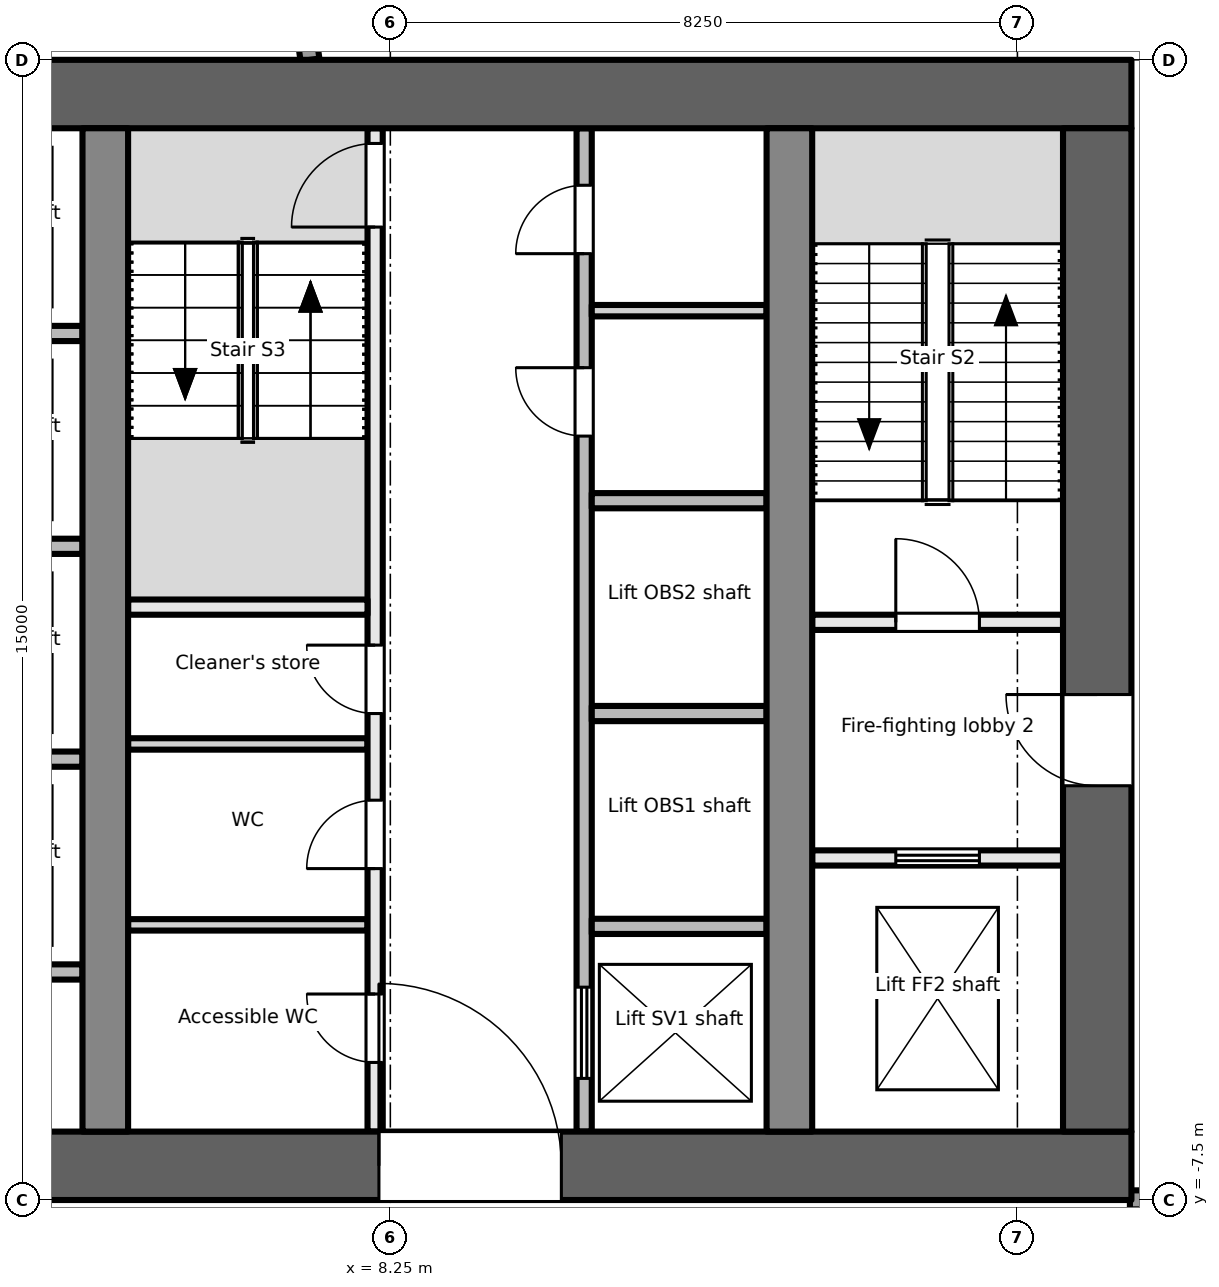
"""IFC4 building model, lengths in metres.
Left out: names, types, materials, properties, quantities, classifications, styles, units other than length and angle.
Written with IfcOpenShell. Run it as: python <this file> out.ifc"""

import sys

from ifc_helpers import new_model, si_unit, direction, frame, frame_2d, origin, place, context, subcontext, project, spatial, rectangle, extrude, element, fill, save


model = new_model("IFC4")
c1 = context("Model", 3, precision=1e-05, world=origin(), true_north=direction((0.0, 1.0)))
c2 = subcontext(c1, "Body", "Model", "MODEL_VIEW")
j1 = project(units=[si_unit("LENGTHUNIT", "METRE"), si_unit("PLANEANGLEUNIT", "RADIAN")], contexts=[c1])
p1 = place(None, origin())
s1 = spatial("IfcSite", under=j1, at=p1, CompositionType="ELEMENT")
p2 = place(p1, origin())
s2 = spatial("IfcBuilding", under=s1, at=p2, CompositionType="ELEMENT")
p3 = place(p2, frame((0.0, 0.0, 244.7)))
s3 = spatial("IfcBuildingStorey", under=s2, at=p3, CompositionType="ELEMENT", Elevation=244.7)
p4 = place(p3, frame((-18.0, -7.05, -0.2), z_axis=(0.0, 0.0, 1.0), x_axis=(1.0, 0.0, 0.0)))
e1 = element("IfcWall", 1, at=p4, inside=s3, PredefinedType="SHEAR", context=c2, shape_type="SweptSolid", body=[
    extrude(rectangle(XDim=36.0, YDim=0.9, at=frame_2d((18.0, 0.0))), origin(), (0.0, 0.0, 1.0), 5.0),
])
p5 = place(p4, frame((8.1, 0.0, 0.2)))
e2 = element("IfcOpeningElement", 2, at=p5, cuts=e1, PredefinedType="OPENING", context=c2, shape_type="SweptSolid", body=[
    extrude(rectangle(XDim=1.8, YDim=2.1, at=frame_2d((0.9, 1.05))), frame((0.0, 0.46, 0.0), z_axis=(0.0, -1.0, 0.0), x_axis=(1.0, 0.0, 0.0)), (0.0, 0.0, 1.0), 0.921),
])
p6 = place(p4, frame((16.8, 0.0, 0.2)))
e3 = element("IfcOpeningElement", 3, at=p6, cuts=e1, PredefinedType="OPENING", context=c2, shape_type="SweptSolid", body=[
    extrude(rectangle(XDim=2.4, YDim=2.1, at=frame_2d((1.2, 1.05))), frame((0.0, 0.46, 0.0), z_axis=(0.0, -1.0, 0.0), x_axis=(1.0, 0.0, 0.0)), (0.0, 0.0, 1.0), 0.921),
])
p7 = place(p4, frame((26.1, 0.0, 0.2)))
e4 = element("IfcOpeningElement", 4, at=p7, cuts=e1, PredefinedType="OPENING", context=c2, shape_type="SweptSolid", body=[
    extrude(rectangle(XDim=2.4, YDim=2.1, at=frame_2d((1.2, 1.05))), frame((0.0, 0.46, 0.0), z_axis=(0.0, -1.0, 0.0), x_axis=(1.0, 0.0, 0.0)), (0.0, 0.0, 1.0), 0.921),
])
p8 = place(p3, frame((-18.0, 7.05, -0.2), z_axis=(0.0, 0.0, 1.0), x_axis=(1.0, 0.0, 0.0)))
e5 = element("IfcWall", 5, at=p8, inside=s3, PredefinedType="SHEAR", context=c2, shape_type="SweptSolid", body=[
    extrude(rectangle(XDim=36.0, YDim=0.9, at=frame_2d((18.0, 0.0))), origin(), (0.0, 0.0, 1.0), 5.0),
])
p9 = place(p3, frame((17.55, -6.6, -0.2), z_axis=(0.0, 0.0, 1.0), x_axis=(0.0, 1.0, 0.0)))
e6 = element("IfcWall", 6, at=p9, inside=s3, PredefinedType="SHEAR", context=c2, shape_type="SweptSolid", body=[
    extrude(rectangle(XDim=13.2, YDim=0.9, at=frame_2d((6.6, 0.0))), origin(), (0.0, 0.0, 1.0), 5.0),
])
p10 = place(p9, frame((4.55, 0.0, 0.2)))
e7 = element("IfcOpeningElement", 7, at=p10, cuts=e6, PredefinedType="OPENING", context=c2, shape_type="SweptSolid", body=[
    extrude(rectangle(XDim=1.2, YDim=2.1, at=frame_2d((0.6, 1.05))), frame((0.0, 0.46, 0.0), z_axis=(0.0, -1.0, 0.0), x_axis=(1.0, 0.0, 0.0)), (0.0, 0.0, 1.0), 0.921),
])
for number, where, z_axis, x_axis in (
    (8, (4.5, -6.6, -0.2), (0.0, 0.0, 1.0), (0.0, 1.0, 0.0)),
    (9, (13.5, -6.6, -0.2), (0.0, 0.0, 1.0), (0.0, 1.0, 0.0)),
):
    element("IfcWall", number, at=place(p3, frame(where, z_axis=z_axis, x_axis=x_axis)), inside=s3, PredefinedType="SHEAR", context=c2, shape_type="SweptSolid", body=[
        extrude(rectangle(XDim=13.2, YDim=0.6, at=frame_2d((6.6, 0.0))), origin(), (0.0, 0.0, 1.0), 5.0),
    ])
p11 = place(p3, frame((13.8, -3.0, 0.0), z_axis=(0.0, 0.0, 1.0), x_axis=(1.0, 0.0, 0.0)))
e10 = element("IfcWall", 10, at=p11, inside=s3, PredefinedType="PARTITIONING", context=c2, shape_type="SweptSolid", body=[
    extrude(rectangle(XDim=3.3, YDim=0.2, at=frame_2d((1.65, 0.0))), origin(), (0.0, 0.0, 1.0), 4.8),
])
p12 = place(p11, frame((1.1, 0.0, 0.0)))
e11 = element("IfcOpeningElement", 11, at=p12, cuts=e10, PredefinedType="OPENING", context=c2, shape_type="SweptSolid", body=[
    extrude(rectangle(XDim=1.1, YDim=2.1, at=frame_2d((0.55, 1.05))), frame((0.0, 0.111, 0.0), z_axis=(0.0, -1.0, 0.0), x_axis=(1.0, 0.0, 0.0)), (0.0, 0.0, 1.0), 0.221),
])
p13 = place(p3, frame((13.8, 0.1, 0.0), z_axis=(0.0, 0.0, 1.0), x_axis=(1.0, 0.0, 0.0)))
e12 = element("IfcWall", 12, at=p13, inside=s3, PredefinedType="PARTITIONING", context=c2, shape_type="SweptSolid", body=[
    extrude(rectangle(XDim=3.3, YDim=0.2, at=frame_2d((1.65, 0.0))), origin(), (0.0, 0.0, 1.0), 4.8),
])
p14 = place(p13, frame((1.1, 0.0, 0.0)))
e13 = element("IfcOpeningElement", 13, at=p14, cuts=e12, PredefinedType="OPENING", context=c2, shape_type="SweptSolid", body=[
    extrude(rectangle(XDim=1.1, YDim=2.1, at=frame_2d((0.55, 1.05))), frame((0.0, 0.111, 0.0), z_axis=(0.0, -1.0, 0.0), x_axis=(1.0, 0.0, 0.0)), (0.0, 0.0, 1.0), 0.221),
])
for number, where, z_axis, x_axis in (
    (14, (1.9, -1.7, 0.0), (0.0, 0.0, 1.0), (1.0, 0.0, 0.0)),
    (15, (1.9, 1.1, 0.0), (0.0, 0.0, 1.0), (1.0, 0.0, 0.0)),
    (16, (1.9, 3.9, 0.0), (0.0, 0.0, 1.0), (1.0, 0.0, 0.0)),
    (17, (1.9, -4.5, 0.0), (0.0, 0.0, 1.0), (1.0, 0.0, 0.0)),
):
    element("IfcWall", number, at=place(p3, frame(where, z_axis=z_axis, x_axis=x_axis)), inside=s3, PredefinedType="PARTITIONING", context=c2, shape_type="SweptSolid", body=[
        extrude(rectangle(XDim=2.3, YDim=0.2, at=frame_2d((1.15, 0.0))), origin(), (0.0, 0.0, 1.0), 4.8),
    ])
p15 = place(p3, frame((8.05, -6.6, 0.0), z_axis=(0.0, 0.0, 1.0), x_axis=(0.0, 1.0, 0.0)))
e18 = element("IfcWall", 18, at=p15, inside=s3, PredefinedType="PARTITIONING", context=c2, shape_type="SweptSolid", body=[
    extrude(rectangle(XDim=13.2, YDim=0.2, at=frame_2d((6.6, 0.0))), origin(), (0.0, 0.0, 1.0), 4.8),
])
p16 = place(p15, frame((0.91, 0.0, 0.0)))
e19 = element("IfcOpeningElement", 19, at=p16, cuts=e18, PredefinedType="OPENING", context=c2, shape_type="SweptSolid", body=[
    extrude(rectangle(XDim=0.9, YDim=2.1, at=frame_2d((0.45, 1.05))), frame((0.0, 0.111, 0.0), z_axis=(0.0, -1.0, 0.0), x_axis=(1.0, 0.0, 0.0)), (0.0, 0.0, 1.0), 0.221),
])
p17 = place(p15, frame((3.46, 0.0, 0.0)))
e20 = element("IfcOpeningElement", 20, at=p17, cuts=e18, PredefinedType="OPENING", context=c2, shape_type="SweptSolid", body=[
    extrude(rectangle(XDim=0.9, YDim=2.1, at=frame_2d((0.45, 1.05))), frame((0.0, 0.111, 0.0), z_axis=(0.0, -1.0, 0.0), x_axis=(1.0, 0.0, 0.0)), (0.0, 0.0, 1.0), 0.221),
])
p18 = place(p15, frame((5.5, 0.0, 0.0)))
e21 = element("IfcOpeningElement", 21, at=p18, cuts=e18, PredefinedType="OPENING", context=c2, shape_type="SweptSolid", body=[
    extrude(rectangle(XDim=0.9, YDim=2.1, at=frame_2d((0.45, 1.05))), frame((0.0, 0.111, 0.0), z_axis=(0.0, -1.0, 0.0), x_axis=(1.0, 0.0, 0.0)), (0.0, 0.0, 1.0), 0.221),
])
p19 = place(p15, frame((11.9, 0.0, 0.0)))
e22 = element("IfcOpeningElement", 22, at=p19, cuts=e18, PredefinedType="OPENING", context=c2, shape_type="SweptSolid", body=[
    extrude(rectangle(XDim=1.1, YDim=2.1, at=frame_2d((0.55, 1.05))), frame((0.0, 0.111, 0.0), z_axis=(0.0, -1.0, 0.0), x_axis=(1.0, 0.0, 0.0)), (0.0, 0.0, 1.0), 0.221),
])
p20 = place(p3, frame((10.8, -6.6, 0.0), z_axis=(0.0, 0.0, 1.0), x_axis=(0.0, 1.0, 0.0)))
e23 = element("IfcWall", 23, at=p20, inside=s3, PredefinedType="PARTITIONING", context=c2, shape_type="SweptSolid", body=[
    extrude(rectangle(XDim=13.2, YDim=0.2, at=frame_2d((6.6, 0.0))), origin(), (0.0, 0.0, 1.0), 4.8),
])
p21 = place(p20, frame((0.7, 0.0, 0.0)))
e24 = element("IfcOpeningElement", 24, at=p21, cuts=e23, PredefinedType="OPENING", context=c2, shape_type="SweptSolid", body=[
    extrude(rectangle(XDim=1.2, YDim=2.1, at=frame_2d((0.6, 1.05))), frame((0.0, 0.111, 0.0), z_axis=(0.0, -1.0, 0.0), x_axis=(1.0, 0.0, 0.0)), (0.0, 0.0, 1.0), 0.221),
])
p22 = place(p20, frame((9.15, 0.0, 0.0)))
e25 = element("IfcOpeningElement", 25, at=p22, cuts=e23, PredefinedType="OPENING", context=c2, shape_type="SweptSolid", body=[
    extrude(rectangle(XDim=0.9, YDim=2.1, at=frame_2d((0.45, 1.05))), frame((0.0, 0.111, 0.0), z_axis=(0.0, -1.0, 0.0), x_axis=(1.0, 0.0, 0.0)), (0.0, 0.0, 1.0), 0.221),
])
p23 = place(p20, frame((11.55, 0.0, 0.0)))
e26 = element("IfcOpeningElement", 26, at=p23, cuts=e23, PredefinedType="OPENING", context=c2, shape_type="SweptSolid", body=[
    extrude(rectangle(XDim=0.9, YDim=2.1, at=frame_2d((0.45, 1.05))), frame((0.0, 0.111, 0.0), z_axis=(0.0, -1.0, 0.0), x_axis=(1.0, 0.0, 0.0)), (0.0, 0.0, 1.0), 0.221),
])
p24 = place(p3, frame((4.8, 0.3, 0.0), z_axis=(0.0, 0.0, 1.0), x_axis=(1.0, 0.0, 0.0)))
e27 = element("IfcWall", 27, at=p24, inside=s3, PredefinedType="PARTITIONING", context=c2, shape_type="SweptSolid", body=[
    extrude(rectangle(XDim=3.15, YDim=0.2, at=frame_2d((1.575, 0.0))), origin(), (0.0, 0.0, 1.0), 4.8),
])
for number, where, z_axis, x_axis in (
    (28, (4.8, -3.88, 0.0), (0.0, 0.0, 1.0), (1.0, 0.0, 0.0)),
    (29, (4.8, -1.5, 0.0), (0.0, 0.0, 1.0), (1.0, 0.0, 0.0)),
):
    element("IfcWall", number, at=place(p3, frame(where, z_axis=z_axis, x_axis=x_axis)), inside=s3, PredefinedType="PARTITIONING", context=c2, shape_type="SweptSolid", body=[
        extrude(rectangle(XDim=3.15, YDim=0.15, at=frame_2d((1.575, 0.0))), origin(), (0.0, 0.0, 1.0), 4.8),
    ])
for number, where, z_axis, x_axis in (
    (30, (10.9, -3.9, 0.0), (0.0, 0.0, 1.0), (1.0, 0.0, 0.0)),
    (31, (10.9, -1.1, 0.0), (0.0, 0.0, 1.0), (1.0, 0.0, 0.0)),
    (32, (10.9, 1.7, 0.0), (0.0, 0.0, 1.0), (1.0, 0.0, 0.0)),
):
    element("IfcWall", number, at=place(p3, frame(where, z_axis=z_axis, x_axis=x_axis)), inside=s3, PredefinedType="PARTITIONING", context=c2, shape_type="SweptSolid", body=[
        extrude(rectangle(XDim=2.3, YDim=0.2, at=frame_2d((1.15, 0.0))), origin(), (0.0, 0.0, 1.0), 4.8),
    ])
p25 = place(p3, frame((10.9, 4.2, 0.0), z_axis=(0.0, 0.0, 1.0), x_axis=(1.0, 0.0, 0.0)))
e33 = element("IfcWall", 33, at=p25, inside=s3, PredefinedType="PARTITIONING", context=c2, shape_type="SweptSolid", body=[
    extrude(rectangle(XDim=2.3, YDim=0.15, at=frame_2d((1.15, 0.0))), origin(), (0.0, 0.0, 1.0), 4.8),
])
p26 = place(p3, frame((17.98, -7.498, 0.0), z_axis=(0.0, 0.0, 1.0), x_axis=(1.0, 0.0, 0.0)))
e34 = element("IfcWall", 34, at=p26, inside=s3, PredefinedType="PARTITIONING", context=c2, shape_type="SweptSolid", body=[
    extrude(rectangle(XDim=1.696, YDim=0.25, at=frame_2d((0.848, 0.0))), origin(), (0.0, 0.0, 1.0), 4.8),
])
p27 = place(p3, frame((7.193, 7.5, 0.0), z_axis=(0.0, 0.0, 1.0), x_axis=(-0.139242385589, 0.99025832895, 0.0)))
e35 = element("IfcWall", 35, at=p27, inside=s3, PredefinedType="PARTITIONING", context=c2, shape_type="SweptSolid", body=[
    extrude(rectangle(XDim=5.711, YDim=0.25, at=frame_2d((2.855, 0.0))), origin(), (0.0, 0.0, 1.0), 4.8),
])
p28 = place(p12, origin())
e36 = element("IfcDoor", 36, at=p28, inside=s3, OperationType="DOUBLE_DOOR_SLIDING", PredefinedType="DOOR", context=c2, shape_type="SweptSolid", body=[
    extrude(rectangle(XDim=1.1, YDim=2.1, at=frame_2d((0.55, 1.05))), frame((0.0, 0.025, 0.0), z_axis=(0.0, -1.0, 0.0), x_axis=(1.0, 0.0, 0.0)), (0.0, 0.0, 1.0), 0.05),
])
fill(e11, e36)
p29 = place(p10, origin())
e37 = element("IfcDoor", 37, at=p29, inside=s3, OperationType="SINGLE_SWING_RIGHT", PredefinedType="DOOR", context=c2, shape_type="SweptSolid", body=[
    extrude(rectangle(XDim=1.2, YDim=2.1, at=frame_2d((0.6, 1.05))), frame((0.0, 0.025, 0.0), z_axis=(0.0, -1.0, 0.0), x_axis=(1.0, 0.0, 0.0)), (0.0, 0.0, 1.0), 0.05),
])
fill(e7, e37)
p30 = place(p14, origin())
e38 = element("IfcDoor", 38, at=p30, inside=s3, OperationType="SINGLE_SWING_LEFT", PredefinedType="DOOR", context=c2, shape_type="SweptSolid", body=[
    extrude(rectangle(XDim=1.1, YDim=2.1, at=frame_2d((0.55, 1.05))), frame((0.0, 0.025, 0.0), z_axis=(0.0, -1.0, 0.0), x_axis=(1.0, 0.0, 0.0)), (0.0, 0.0, 1.0), 0.05),
])
fill(e13, e38)
p31 = place(p16, origin())
e39 = element("IfcDoor", 39, at=p31, inside=s3, OperationType="SINGLE_SWING_RIGHT", PredefinedType="DOOR", context=c2, shape_type="SweptSolid", body=[
    extrude(rectangle(XDim=0.9, YDim=2.1, at=frame_2d((0.45, 1.05))), frame((0.0, 0.025, 0.0), z_axis=(0.0, -1.0, 0.0), x_axis=(1.0, 0.0, 0.0)), (0.0, 0.0, 1.0), 0.05),
])
fill(e19, e39)
p32 = place(p17, origin())
e40 = element("IfcDoor", 40, at=p32, inside=s3, OperationType="SINGLE_SWING_LEFT", PredefinedType="DOOR", context=c2, shape_type="SweptSolid", body=[
    extrude(rectangle(XDim=0.9, YDim=2.1, at=frame_2d((0.45, 1.05))), frame((0.0, 0.025, 0.0), z_axis=(0.0, -1.0, 0.0), x_axis=(1.0, 0.0, 0.0)), (0.0, 0.0, 1.0), 0.05),
])
fill(e20, e40)
p33 = place(p18, origin())
e41 = element("IfcDoor", 41, at=p33, inside=s3, OperationType="SINGLE_SWING_RIGHT", PredefinedType="DOOR", context=c2, shape_type="SweptSolid", body=[
    extrude(rectangle(XDim=0.9, YDim=2.1, at=frame_2d((0.45, 1.05))), frame((0.0, 0.025, 0.0), z_axis=(0.0, -1.0, 0.0), x_axis=(1.0, 0.0, 0.0)), (0.0, 0.0, 1.0), 0.05),
])
fill(e21, e41)
p34 = place(p19, origin())
e42 = element("IfcDoor", 42, at=p34, inside=s3, OperationType="SINGLE_SWING_LEFT", PredefinedType="DOOR", context=c2, shape_type="SweptSolid", body=[
    extrude(rectangle(XDim=1.1, YDim=2.1, at=frame_2d((0.55, 1.05))), frame((0.0, 0.025, 0.0), z_axis=(0.0, -1.0, 0.0), x_axis=(1.0, 0.0, 0.0)), (0.0, 0.0, 1.0), 0.05),
])
fill(e22, e42)
p35 = place(p7, origin())
e43 = element("IfcDoor", 43, at=p35, inside=s3, OperationType="DOUBLE_DOOR_DOUBLE_SWING", PredefinedType="DOOR", context=c2, shape_type="SweptSolid", body=[
    extrude(rectangle(XDim=2.4, YDim=2.1, at=frame_2d((1.2, 1.05))), frame((0.0, 0.025, 0.0), z_axis=(0.0, -1.0, 0.0), x_axis=(1.0, 0.0, 0.0)), (0.0, 0.0, 1.0), 0.05),
])
fill(e4, e43)
p36 = place(p21, origin())
e44 = element("IfcDoor", 44, at=p36, inside=s3, OperationType="DOUBLE_DOOR_SLIDING", PredefinedType="DOOR", context=c2, shape_type="SweptSolid", body=[
    extrude(rectangle(XDim=1.2, YDim=2.1, at=frame_2d((0.6, 1.05))), frame((0.0, 0.025, 0.0), z_axis=(0.0, -1.0, 0.0), x_axis=(1.0, 0.0, 0.0)), (0.0, 0.0, 1.0), 0.05),
])
fill(e24, e44)
p37 = place(p22, origin())
e45 = element("IfcDoor", 45, at=p37, inside=s3, OperationType="SINGLE_SWING_RIGHT", PredefinedType="DOOR", context=c2, shape_type="SweptSolid", body=[
    extrude(rectangle(XDim=0.9, YDim=2.1, at=frame_2d((0.45, 1.05))), frame((0.0, 0.025, 0.0), z_axis=(0.0, -1.0, 0.0), x_axis=(1.0, 0.0, 0.0)), (0.0, 0.0, 1.0), 0.05),
])
fill(e25, e45)
p38 = place(p23, origin())
e46 = element("IfcDoor", 46, at=p38, inside=s3, OperationType="SINGLE_SWING_LEFT", PredefinedType="DOOR", context=c2, shape_type="SweptSolid", body=[
    extrude(rectangle(XDim=0.9, YDim=2.1, at=frame_2d((0.45, 1.05))), frame((0.0, 0.025, 0.0), z_axis=(0.0, -1.0, 0.0), x_axis=(1.0, 0.0, 0.0)), (0.0, 0.0, 1.0), 0.05),
])
fill(e26, e46)
save(model, sys.argv[1])
